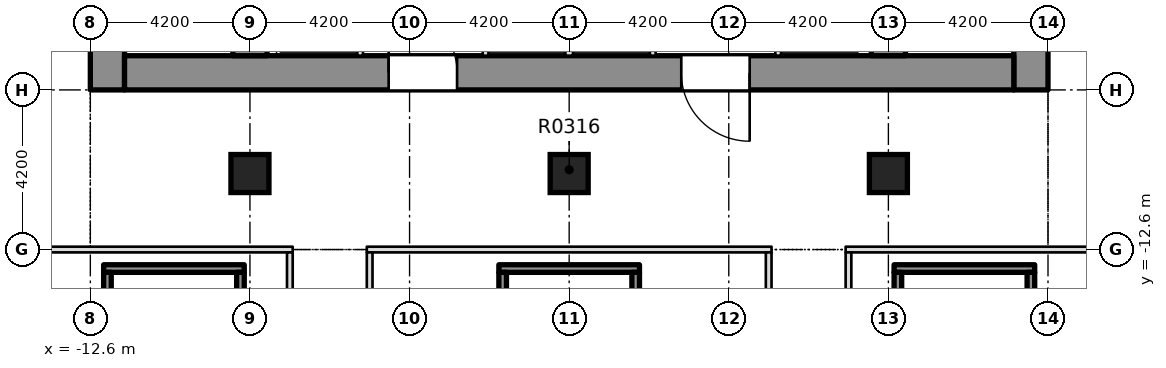
"""IFC4 building model, lengths in metres.
Left out: names, types, materials, properties, quantities, classifications, styles, units other than length and angle.
Written with IfcOpenShell. Run it as: python <this file> out.ifc"""

import sys

from ifc_helpers import new_model, si_unit, direction, frame, frame_2d, origin, origin_2d, place, context, subcontext, project, spatial, rectangle, extrude, element, fill, save


model = new_model("IFC4")
c1 = context("Model", 3, precision=1e-05, world=origin(), true_north=direction((0.0, 1.0)))
c2 = subcontext(c1, "Body", "Model", "MODEL_VIEW")
j1 = project(units=[si_unit("LENGTHUNIT", "METRE"), si_unit("PLANEANGLEUNIT", "RADIAN")], contexts=[c1])
p1 = place(None, origin())
s1 = spatial("IfcSite", under=j1, at=p1, CompositionType="ELEMENT")
p2 = place(p1, origin())
s2 = spatial("IfcBuilding", under=s1, at=p2, CompositionType="ELEMENT")
p3 = place(p2, frame((0.0, 0.0, 20.0)))
s3 = spatial("IfcBuildingStorey", under=s2, at=p3, CompositionType="ELEMENT", Elevation=20.0)
p4 = place(p3, frame((12.15, -8.4, -0.4), z_axis=(0.0, 0.0, 1.0), x_axis=(0.0, 1.0, 0.0)))
e1 = element("IfcWall", 1, at=p4, inside=s3, PredefinedType="SHEAR", context=c2, shape_type="SweptSolid", body=[
    extrude(rectangle(XDim=30.15, YDim=0.9, at=frame_2d((15.075, 0.0))), origin(), (0.0, 0.0, 1.0), 5.0),
])
p5 = place(p4, frame((3.925, 0.0, 0.4)))
e2 = element("IfcOpeningElement", 2, at=p5, cuts=e1, PredefinedType="OPENING", context=c2, shape_type="SweptSolid", body=[
    extrude(rectangle(XDim=0.95, YDim=2.1, at=frame_2d((0.475, 1.05))), frame((0.0, 0.46, 0.0), z_axis=(0.0, -1.0, 0.0), x_axis=(1.0, 0.0, 0.0)), (0.0, 0.0, 1.0), 0.92),
])
p6 = place(p4, frame((9.175, 0.0, 0.4)))
e3 = element("IfcOpeningElement", 3, at=p6, cuts=e1, PredefinedType="OPENING", context=c2, shape_type="SweptSolid", body=[
    extrude(rectangle(XDim=0.95, YDim=2.1, at=frame_2d((0.475, 1.05))), frame((0.0, 0.46, 0.0), z_axis=(0.0, -1.0, 0.0), x_axis=(1.0, 0.0, 0.0)), (0.0, 0.0, 1.0), 0.92),
])
p7 = place(p4, frame((14.525, 0.0, 0.4)))
e4 = element("IfcOpeningElement", 4, at=p7, cuts=e1, PredefinedType="OPENING", context=c2, shape_type="SweptSolid", body=[
    extrude(rectangle(XDim=0.95, YDim=2.1, at=frame_2d((0.475, 1.05))), frame((0.0, 0.46, 0.0), z_axis=(0.0, -1.0, 0.0), x_axis=(1.0, 0.0, 0.0)), (0.0, 0.0, 1.0), 0.92),
])
p8 = place(p4, frame((22.225, 0.0, 0.4)))
e5 = element("IfcOpeningElement", 5, at=p8, cuts=e1, PredefinedType="OPENING", context=c2, shape_type="SweptSolid", body=[
    extrude(rectangle(XDim=0.95, YDim=2.1, at=frame_2d((0.475, 1.05))), frame((0.0, 0.46, 0.0), z_axis=(0.0, -1.0, 0.0), x_axis=(1.0, 0.0, 0.0)), (0.0, 0.0, 1.0), 0.92),
])
p9 = place(p4, frame((26.25, 0.0, 0.4)))
e6 = element("IfcOpeningElement", 6, at=p9, cuts=e1, PredefinedType="OPENING", context=c2, shape_type="SweptSolid", body=[
    extrude(rectangle(XDim=0.95, YDim=2.1, at=frame_2d((0.475, 1.05))), frame((0.0, 0.46, 0.0), z_axis=(0.0, -1.0, 0.0), x_axis=(1.0, 0.0, 0.0)), (0.0, 0.0, 1.0), 0.92),
])
p10 = place(p4, frame((19.3, 0.0, 0.4)))
e7 = element("IfcOpeningElement", 7, at=p10, cuts=e1, PredefinedType="OPENING", context=c2, shape_type="SweptSolid", body=[
    extrude(rectangle(XDim=1.2, YDim=2.1, at=frame_2d((0.6, 1.05))), frame((0.0, 0.46, 0.0), z_axis=(0.0, -1.0, 0.0), x_axis=(1.0, 0.0, 0.0)), (0.0, 0.0, 1.0), 0.92),
])
p11 = place(p3, frame((-12.15, -8.4, -0.4), z_axis=(0.0, 0.0, 1.0), x_axis=(0.0, 1.0, 0.0)))
e8 = element("IfcWall", 8, at=p11, inside=s3, PredefinedType="SHEAR", context=c2, shape_type="SweptSolid", body=[
    extrude(rectangle(XDim=30.15, YDim=0.9, at=frame_2d((15.075, 0.0))), origin(), (0.0, 0.0, 1.0), 5.0),
])
p12 = place(p11, frame((3.425, 0.0, 0.4)))
e9 = element("IfcOpeningElement", 9, at=p12, cuts=e8, PredefinedType="OPENING", context=c2, shape_type="SweptSolid", body=[
    extrude(rectangle(XDim=0.95, YDim=2.1, at=frame_2d((0.475, 1.05))), frame((0.0, 0.46, 0.0), z_axis=(0.0, -1.0, 0.0), x_axis=(1.0, 0.0, 0.0)), (0.0, 0.0, 1.0), 0.92),
])
p13 = place(p11, frame((8.075, 0.0, 0.4)))
e10 = element("IfcOpeningElement", 10, at=p13, cuts=e8, PredefinedType="OPENING", context=c2, shape_type="SweptSolid", body=[
    extrude(rectangle(XDim=0.95, YDim=2.1, at=frame_2d((0.475, 1.05))), frame((0.0, 0.46, 0.0), z_axis=(0.0, -1.0, 0.0), x_axis=(1.0, 0.0, 0.0)), (0.0, 0.0, 1.0), 0.92),
])
p14 = place(p11, frame((11.425, 0.0, 0.4)))
e11 = element("IfcOpeningElement", 11, at=p14, cuts=e8, PredefinedType="OPENING", context=c2, shape_type="SweptSolid", body=[
    extrude(rectangle(XDim=0.95, YDim=2.1, at=frame_2d((0.475, 1.05))), frame((0.0, 0.46, 0.0), z_axis=(0.0, -1.0, 0.0), x_axis=(1.0, 0.0, 0.0)), (0.0, 0.0, 1.0), 0.92),
])
p15 = place(p11, frame((15.625, 0.0, 0.4)))
e12 = element("IfcOpeningElement", 12, at=p15, cuts=e8, PredefinedType="OPENING", context=c2, shape_type="SweptSolid", body=[
    extrude(rectangle(XDim=0.95, YDim=2.1, at=frame_2d((0.475, 1.05))), frame((0.0, 0.46, 0.0), z_axis=(0.0, -1.0, 0.0), x_axis=(1.0, 0.0, 0.0)), (0.0, 0.0, 1.0), 0.92),
])
p16 = place(p11, frame((22.725, 0.0, 0.4)))
e13 = element("IfcOpeningElement", 13, at=p16, cuts=e8, PredefinedType="OPENING", context=c2, shape_type="SweptSolid", body=[
    extrude(rectangle(XDim=0.95, YDim=2.1, at=frame_2d((0.475, 1.05))), frame((0.0, 0.46, 0.0), z_axis=(0.0, -1.0, 0.0), x_axis=(1.0, 0.0, 0.0)), (0.0, 0.0, 1.0), 0.92),
])
p17 = place(p11, frame((26.75, 0.0, 0.4)))
e14 = element("IfcOpeningElement", 14, at=p17, cuts=e8, PredefinedType="OPENING", context=c2, shape_type="SweptSolid", body=[
    extrude(rectangle(XDim=0.95, YDim=2.1, at=frame_2d((0.475, 1.05))), frame((0.0, 0.46, 0.0), z_axis=(0.0, -1.0, 0.0), x_axis=(1.0, 0.0, 0.0)), (0.0, 0.0, 1.0), 0.92),
])
p18 = place(p11, frame((19.3, 0.0, 0.4)))
e15 = element("IfcOpeningElement", 15, at=p18, cuts=e8, PredefinedType="OPENING", context=c2, shape_type="SweptSolid", body=[
    extrude(rectangle(XDim=1.2, YDim=2.1, at=frame_2d((0.6, 1.05))), frame((0.0, 0.46, 0.0), z_axis=(0.0, -1.0, 0.0), x_axis=(1.0, 0.0, 0.0)), (0.0, 0.0, 1.0), 0.92),
])
p19 = place(p3, frame((-11.7, -7.95, -0.4), z_axis=(0.0, 0.0, 1.0), x_axis=(1.0, 0.0, 0.0)))
e16 = element("IfcWall", 16, at=p19, inside=s3, PredefinedType="SHEAR", context=c2, shape_type="SweptSolid", body=[
    extrude(rectangle(XDim=23.4, YDim=0.9, at=frame_2d((11.7, 0.0))), origin(), (0.0, 0.0, 1.0), 5.0),
])
p20 = place(p19, frame((6.95, 0.0, 0.4)))
e17 = element("IfcOpeningElement", 17, at=p20, cuts=e16, PredefinedType="OPENING", context=c2, shape_type="SweptSolid", body=[
    extrude(rectangle(XDim=1.8, YDim=2.1, at=frame_2d((0.9, 1.05))), frame((0.0, 0.46, 0.0), z_axis=(0.0, -1.0, 0.0), x_axis=(1.0, 0.0, 0.0)), (0.0, 0.0, 1.0), 0.92),
])
p21 = place(p19, frame((14.65, 0.0, 0.4)))
e18 = element("IfcOpeningElement", 18, at=p21, cuts=e16, PredefinedType="OPENING", context=c2, shape_type="SweptSolid", body=[
    extrude(rectangle(XDim=1.8, YDim=2.1, at=frame_2d((0.9, 1.05))), frame((0.0, 0.46, 0.0), z_axis=(0.0, -1.0, 0.0), x_axis=(1.0, 0.0, 0.0)), (0.0, 0.0, 1.0), 0.92),
])
p22 = place(p3, frame((-8.4, -7.5, -0.4), z_axis=(0.0, 0.0, 1.0), x_axis=(0.0, 1.0, 0.0)))
e19 = element("IfcWall", 19, at=p22, inside=s3, PredefinedType="SHEAR", context=c2, shape_type="SweptSolid", body=[
    extrude(rectangle(XDim=28.35, YDim=0.9, at=frame_2d((14.175, 0.0))), origin(), (0.0, 0.0, 1.0), 5.0),
])
p23 = place(p22, frame((18.4, 0.0, 0.4)))
e20 = element("IfcOpeningElement", 20, at=p23, cuts=e19, PredefinedType="OPENING", context=c2, shape_type="SweptSolid", body=[
    extrude(rectangle(XDim=1.2, YDim=2.1, at=frame_2d((0.6, 1.05))), frame((0.0, 0.46, 0.0), z_axis=(0.0, -1.0, 0.0), x_axis=(1.0, 0.0, 0.0)), (0.0, 0.0, 1.0), 0.92),
])
p24 = place(p3, frame((8.4, -7.5, -0.4), z_axis=(0.0, 0.0, 1.0), x_axis=(0.0, 1.0, 0.0)))
e21 = element("IfcWall", 21, at=p24, inside=s3, PredefinedType="SHEAR", context=c2, shape_type="SweptSolid", body=[
    extrude(rectangle(XDim=28.35, YDim=0.9, at=frame_2d((14.175, 0.0))), origin(), (0.0, 0.0, 1.0), 5.0),
])
p25 = place(p24, frame((18.4, 0.0, 0.4)))
e22 = element("IfcOpeningElement", 22, at=p25, cuts=e21, PredefinedType="OPENING", context=c2, shape_type="SweptSolid", body=[
    extrude(rectangle(XDim=1.2, YDim=2.1, at=frame_2d((0.6, 1.05))), frame((0.0, 0.46, 0.0), z_axis=(0.0, -1.0, 0.0), x_axis=(1.0, 0.0, 0.0)), (0.0, 0.0, 1.0), 0.92),
])
for number, where, z_axis, x_axis in (
    (23, (-8.4, -10.6, -0.4), (0.0, 0.0, 1.0), (1.0, 0.0, 0.0)),
    (24, (0.0, -10.6, -0.4), (0.0, 0.0, 1.0), (1.0, 0.0, 0.0)),
    (25, (8.4, -10.6, -0.4), (0.0, 0.0, 1.0), (1.0, 0.0, 0.0)),
):
    element("IfcColumn", number, at=place(p3, frame(where, z_axis=z_axis, x_axis=x_axis)), inside=s3, PredefinedType="COLUMN", context=c2, shape_type="SweptSolid", body=[
        extrude(rectangle(XDim=1.0, YDim=1.0, at=origin_2d()), origin(), (0.0, 0.0, 1.0), 5.0),
    ])
p26 = place(p3, frame((-16.9, -12.6, 0.0), z_axis=(0.0, 0.0, 1.0), x_axis=(1.0, 0.0, 0.0)))
e26 = element("IfcWall", 26, at=p26, inside=s3, PredefinedType="PARTITIONING", context=c2, shape_type="SweptSolid", body=[
    extrude(rectangle(XDim=9.625, YDim=0.15, at=frame_2d((4.812, 0.0))), origin(), (0.0, 0.0, 1.0), 4.6),
])
p27 = place(p3, frame((-5.325, -12.6, 0.0), z_axis=(0.0, 0.0, 1.0), x_axis=(1.0, 0.0, 0.0)))
e27 = element("IfcWall", 27, at=p27, inside=s3, PredefinedType="PARTITIONING", context=c2, shape_type="SweptSolid", body=[
    extrude(rectangle(XDim=10.65, YDim=0.15, at=frame_2d((5.325, 0.0))), origin(), (0.0, 0.0, 1.0), 4.6),
])
p28 = place(p3, frame((7.275, -12.6, 0.0), z_axis=(0.0, 0.0, 1.0), x_axis=(1.0, 0.0, 0.0)))
e28 = element("IfcWall", 28, at=p28, inside=s3, PredefinedType="PARTITIONING", context=c2, shape_type="SweptSolid", body=[
    extrude(rectangle(XDim=9.625, YDim=0.15, at=frame_2d((4.812, 0.0))), origin(), (0.0, 0.0, 1.0), 4.6),
])
for number, where, z_axis, x_axis in (
    (29, (-7.35, -18.125, 0.0), (0.0, 0.0, 1.0), (0.0, 1.0, 0.0)),
    (30, (-5.25, -18.125, 0.0), (0.0, 0.0, 1.0), (0.0, 1.0, 0.0)),
    (31, (5.25, -18.125, 0.0), (0.0, 0.0, 1.0), (0.0, 1.0, 0.0)),
    (32, (7.35, -18.125, 0.0), (0.0, 0.0, 1.0), (0.0, 1.0, 0.0)),
):
    element("IfcWall", number, at=place(p3, frame(where, z_axis=z_axis, x_axis=x_axis)), inside=s3, PredefinedType="PARTITIONING", context=c2, shape_type="SweptSolid", body=[
        extrude(rectangle(XDim=5.45, YDim=0.15, at=frame_2d((2.725, 0.0))), origin(), (0.0, 0.0, 1.0), 4.6),
    ])
p29 = place(p3, frame((-5.5, -7.499, 0.0), z_axis=(0.0, 0.0, 1.0), x_axis=(0.0, 1.0, 0.0)))
e33 = element("IfcWall", 33, at=p29, inside=s3, PredefinedType="PARTITIONING", context=c2, shape_type="SweptSolid", body=[
    extrude(rectangle(XDim=11.924, YDim=0.15, at=frame_2d((5.962, 0.0))), origin(), (0.0, 0.0, 1.0), 4.6),
])
p30 = place(p29, frame((0.949, 0.0, 0.0)))
e34 = element("IfcOpeningElement", 34, at=p30, cuts=e33, PredefinedType="OPENING", context=c2, shape_type="SweptSolid", body=[
    extrude(rectangle(XDim=1.1, YDim=2.1, at=frame_2d((0.55, 1.05))), frame((0.0, 0.085, 0.0), z_axis=(0.0, -1.0, 0.0), x_axis=(1.0, 0.0, 0.0)), (0.0, 0.0, 1.0), 0.17),
])
p31 = place(p29, frame((3.949, 0.0, 0.0)))
e35 = element("IfcOpeningElement", 35, at=p31, cuts=e33, PredefinedType="OPENING", context=c2, shape_type="SweptSolid", body=[
    extrude(rectangle(XDim=1.1, YDim=2.1, at=frame_2d((0.55, 1.05))), frame((0.0, 0.085, 0.0), z_axis=(0.0, -1.0, 0.0), x_axis=(1.0, 0.0, 0.0)), (0.0, 0.0, 1.0), 0.17),
])
p32 = place(p29, frame((6.949, 0.0, 0.0)))
e36 = element("IfcOpeningElement", 36, at=p32, cuts=e33, PredefinedType="OPENING", context=c2, shape_type="SweptSolid", body=[
    extrude(rectangle(XDim=1.1, YDim=2.1, at=frame_2d((0.55, 1.05))), frame((0.0, 0.085, 0.0), z_axis=(0.0, -1.0, 0.0), x_axis=(1.0, 0.0, 0.0)), (0.0, 0.0, 1.0), 0.17),
])
p33 = place(p29, frame((9.949, 0.0, 0.0)))
e37 = element("IfcOpeningElement", 37, at=p33, cuts=e33, PredefinedType="OPENING", context=c2, shape_type="SweptSolid", body=[
    extrude(rectangle(XDim=1.1, YDim=2.1, at=frame_2d((0.55, 1.05))), frame((0.0, 0.085, 0.0), z_axis=(0.0, -1.0, 0.0), x_axis=(1.0, 0.0, 0.0)), (0.0, 0.0, 1.0), 0.17),
])
p34 = place(p3, frame((-2.2, -7.499, 0.0), z_axis=(0.0, 0.0, 1.0), x_axis=(0.0, 1.0, 0.0)))
e38 = element("IfcWall", 38, at=p34, inside=s3, PredefinedType="PARTITIONING", context=c2, shape_type="SweptSolid", body=[
    extrude(rectangle(XDim=11.924, YDim=0.15, at=frame_2d((5.962, 0.0))), origin(), (0.0, 0.0, 1.0), 4.6),
])
p35 = place(p34, frame((0.949, 0.0, 0.0)))
e39 = element("IfcOpeningElement", 39, at=p35, cuts=e38, PredefinedType="OPENING", context=c2, shape_type="SweptSolid", body=[
    extrude(rectangle(XDim=1.1, YDim=2.1, at=frame_2d((0.55, 1.05))), frame((0.0, 0.085, 0.0), z_axis=(0.0, -1.0, 0.0), x_axis=(1.0, 0.0, 0.0)), (0.0, 0.0, 1.0), 0.17),
])
p36 = place(p34, frame((3.949, 0.0, 0.0)))
e40 = element("IfcOpeningElement", 40, at=p36, cuts=e38, PredefinedType="OPENING", context=c2, shape_type="SweptSolid", body=[
    extrude(rectangle(XDim=1.1, YDim=2.1, at=frame_2d((0.55, 1.05))), frame((0.0, 0.085, 0.0), z_axis=(0.0, -1.0, 0.0), x_axis=(1.0, 0.0, 0.0)), (0.0, 0.0, 1.0), 0.17),
])
p37 = place(p34, frame((6.949, 0.0, 0.0)))
e41 = element("IfcOpeningElement", 41, at=p37, cuts=e38, PredefinedType="OPENING", context=c2, shape_type="SweptSolid", body=[
    extrude(rectangle(XDim=1.1, YDim=2.1, at=frame_2d((0.55, 1.05))), frame((0.0, 0.085, 0.0), z_axis=(0.0, -1.0, 0.0), x_axis=(1.0, 0.0, 0.0)), (0.0, 0.0, 1.0), 0.17),
])
p38 = place(p34, frame((9.949, 0.0, 0.0)))
e42 = element("IfcOpeningElement", 42, at=p38, cuts=e38, PredefinedType="OPENING", context=c2, shape_type="SweptSolid", body=[
    extrude(rectangle(XDim=1.1, YDim=2.1, at=frame_2d((0.55, 1.05))), frame((0.0, 0.085, 0.0), z_axis=(0.0, -1.0, 0.0), x_axis=(1.0, 0.0, 0.0)), (0.0, 0.0, 1.0), 0.17),
])
p39 = place(p3, frame((0.0, -7.499, 0.0), z_axis=(0.0, 0.0, 1.0), x_axis=(0.0, 1.0, 0.0)))
e43 = element("IfcWall", 43, at=p39, inside=s3, PredefinedType="PARTITIONING", context=c2, shape_type="SweptSolid", body=[
    extrude(rectangle(XDim=11.924, YDim=0.2, at=frame_2d((5.962, 0.0))), origin(), (0.0, 0.0, 1.0), 4.6),
])
p40 = place(p3, frame((2.2, -7.499, 0.0), z_axis=(0.0, 0.0, 1.0), x_axis=(0.0, 1.0, 0.0)))
e44 = element("IfcWall", 44, at=p40, inside=s3, PredefinedType="PARTITIONING", context=c2, shape_type="SweptSolid", body=[
    extrude(rectangle(XDim=11.924, YDim=0.15, at=frame_2d((5.962, 0.0))), origin(), (0.0, 0.0, 1.0), 4.6),
])
p41 = place(p3, frame((5.5, -7.499, 0.0), z_axis=(0.0, 0.0, 1.0), x_axis=(0.0, 1.0, 0.0)))
e45 = element("IfcWall", 45, at=p41, inside=s3, PredefinedType="PARTITIONING", context=c2, shape_type="SweptSolid", body=[
    extrude(rectangle(XDim=11.924, YDim=0.15, at=frame_2d((5.962, 0.0))), origin(), (0.0, 0.0, 1.0), 4.6),
])
p42 = place(p41, frame((6.949, 0.0, 0.0)))
e46 = element("IfcOpeningElement", 46, at=p42, cuts=e45, PredefinedType="OPENING", context=c2, shape_type="SweptSolid", body=[
    extrude(rectangle(XDim=1.1, YDim=2.1, at=frame_2d((0.55, 1.05))), frame((0.0, 0.085, 0.0), z_axis=(0.0, -1.0, 0.0), x_axis=(1.0, 0.0, 0.0)), (0.0, 0.0, 1.0), 0.17),
])
p43 = place(p41, frame((9.949, 0.0, 0.0)))
e47 = element("IfcOpeningElement", 47, at=p43, cuts=e45, PredefinedType="OPENING", context=c2, shape_type="SweptSolid", body=[
    extrude(rectangle(XDim=1.1, YDim=2.1, at=frame_2d((0.55, 1.05))), frame((0.0, 0.085, 0.0), z_axis=(0.0, -1.0, 0.0), x_axis=(1.0, 0.0, 0.0)), (0.0, 0.0, 1.0), 0.17),
])
p44 = place(p3, frame((-12.25, -13.1, 0.0), z_axis=(0.0, 0.0, 1.0), x_axis=(1.0, 0.0, 0.0)))
e48 = element("IfcWall", 48, at=p44, inside=s3, PredefinedType="SOLIDWALL", context=c2, shape_type="SweptSolid", body=[
    extrude(rectangle(XDim=3.7, YDim=0.2, at=frame_2d((1.85, 0.0))), origin(), (0.0, 0.0, 1.0), 4.6),
])
p45 = place(p3, frame((-12.15, -19.8, 0.0), z_axis=(0.0, 0.0, 1.0), x_axis=(0.0, 1.0, 0.0)))
e49 = element("IfcWall", 49, at=p45, inside=s3, PredefinedType="SOLIDWALL", context=c2, shape_type="SweptSolid", body=[
    extrude(rectangle(XDim=6.6, YDim=0.2, at=frame_2d((3.3, 0.0))), origin(), (0.0, 0.0, 1.0), 4.6),
])
p46 = place(p3, frame((-8.65, -20.3, 0.0), z_axis=(0.0, 0.0, 1.0), x_axis=(0.0, 1.0, 0.0)))
e50 = element("IfcWall", 50, at=p46, inside=s3, PredefinedType="SOLIDWALL", context=c2, shape_type="SweptSolid", body=[
    extrude(rectangle(XDim=7.1, YDim=0.2, at=frame_2d((3.55, 0.0))), origin(), (0.0, 0.0, 1.0), 4.6),
])
p47 = place(p3, frame((-1.85, -13.1, 0.0), z_axis=(0.0, 0.0, 1.0), x_axis=(1.0, 0.0, 0.0)))
e51 = element("IfcWall", 51, at=p47, inside=s3, PredefinedType="SOLIDWALL", context=c2, shape_type="SweptSolid", body=[
    extrude(rectangle(XDim=3.7, YDim=0.2, at=frame_2d((1.85, 0.0))), origin(), (0.0, 0.0, 1.0), 4.6),
])
for number, where, z_axis, x_axis in (
    (52, (-1.75, -19.8, 0.0), (0.0, 0.0, 1.0), (0.0, 1.0, 0.0)),
    (53, (1.75, -19.8, 0.0), (0.0, 0.0, 1.0), (0.0, 1.0, 0.0)),
):
    element("IfcWall", number, at=place(p3, frame(where, z_axis=z_axis, x_axis=x_axis)), inside=s3, PredefinedType="SOLIDWALL", context=c2, shape_type="SweptSolid", body=[
        extrude(rectangle(XDim=6.6, YDim=0.2, at=frame_2d((3.3, 0.0))), origin(), (0.0, 0.0, 1.0), 4.6),
    ])
p48 = place(p3, frame((8.55, -13.1, 0.0), z_axis=(0.0, 0.0, 1.0), x_axis=(1.0, 0.0, 0.0)))
e54 = element("IfcWall", 54, at=p48, inside=s3, PredefinedType="SOLIDWALL", context=c2, shape_type="SweptSolid", body=[
    extrude(rectangle(XDim=3.7, YDim=0.2, at=frame_2d((1.85, 0.0))), origin(), (0.0, 0.0, 1.0), 4.6),
])
p49 = place(p3, frame((8.65, -20.3, 0.0), z_axis=(0.0, 0.0, 1.0), x_axis=(0.0, 1.0, 0.0)))
e55 = element("IfcWall", 55, at=p49, inside=s3, PredefinedType="SOLIDWALL", context=c2, shape_type="SweptSolid", body=[
    extrude(rectangle(XDim=7.1, YDim=0.2, at=frame_2d((3.55, 0.0))), origin(), (0.0, 0.0, 1.0), 4.6),
])
p50 = place(p3, frame((12.15, -19.8, 0.0), z_axis=(0.0, 0.0, 1.0), x_axis=(0.0, 1.0, 0.0)))
e56 = element("IfcWall", 56, at=p50, inside=s3, PredefinedType="SOLIDWALL", context=c2, shape_type="SweptSolid", body=[
    extrude(rectangle(XDim=6.6, YDim=0.2, at=frame_2d((3.3, 0.0))), origin(), (0.0, 0.0, 1.0), 4.6),
])
p51 = place(p20, origin())
e57 = element("IfcDoor", 57, at=p51, inside=s3, OperationType="SINGLE_SWING_LEFT", PredefinedType="DOOR", context=c2, shape_type="SweptSolid", body=[
    extrude(rectangle(XDim=1.8, YDim=2.1, at=frame_2d((0.9, 1.05))), frame((0.0, 0.025, 0.0), z_axis=(0.0, -1.0, 0.0), x_axis=(1.0, 0.0, 0.0)), (0.0, 0.0, 1.0), 0.05),
])
fill(e17, e57)
p52 = place(p21, origin())
e58 = element("IfcDoor", 58, at=p52, inside=s3, OperationType="SINGLE_SWING_LEFT", PredefinedType="DOOR", context=c2, shape_type="SweptSolid", body=[
    extrude(rectangle(XDim=1.8, YDim=2.1, at=frame_2d((0.9, 1.05))), frame((0.0, 0.025, 0.0), z_axis=(0.0, -1.0, 0.0), x_axis=(1.0, 0.0, 0.0)), (0.0, 0.0, 1.0), 0.05),
])
fill(e18, e58)
save(model, sys.argv[1])
